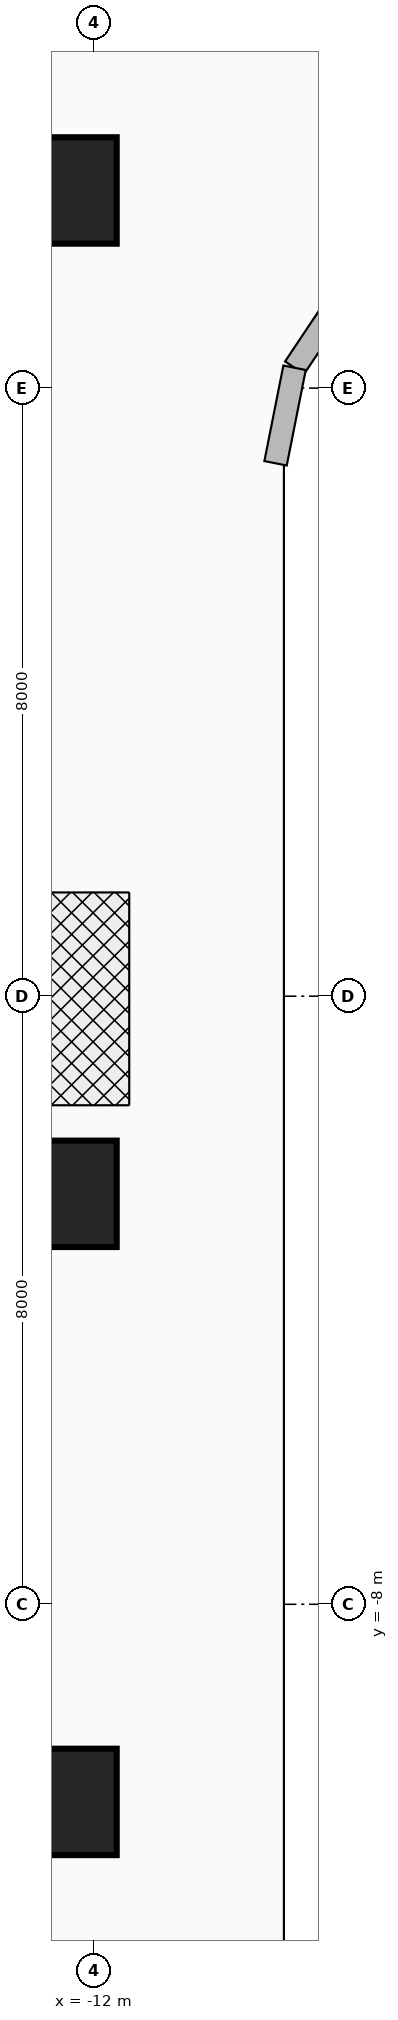
"""IFC4 building model, lengths in metres.
Left out: names, types, materials, properties, quantities, classifications, styles, units other than length and angle.
Written with IfcOpenShell. Run it as: python <this file> out.ifc"""

import sys

from ifc_helpers import new_model, si_unit, direction, frame, frame_2d, origin, origin_2d, place, context, subcontext, project, spatial, rectangle, extrude, source, transform, mapped, element, save


model = new_model("IFC4")
c1 = context("Model", 3, precision=1e-05, world=origin(), true_north=direction((0.0, 1.0)))
c2 = subcontext(c1, "Body", "Model", "MODEL_VIEW")
j1 = project(units=[si_unit("LENGTHUNIT", "METRE"), si_unit("PLANEANGLEUNIT", "RADIAN")], contexts=[c1])
p1 = place(None, origin())
s1 = spatial("IfcSite", under=j1, at=p1, CompositionType="ELEMENT")
p2 = place(p1, origin())
s2 = spatial("IfcBuilding", under=s1, at=p2, CompositionType="ELEMENT")
p3 = place(p2, frame((0.0, 0.0, 48.2)))
s3 = spatial("IfcBuildingStorey", under=s2, at=p3, CompositionType="ELEMENT", Elevation=48.2)
for number, where, z_axis, x_axis in (
    (1, (-22.65, 10.8, 0.0), (0.0, 0.0, 1.0), (1.0, 0.0, 0.0)),
    (2, (-22.65, -10.8, 0.0), (0.0, 0.0, 1.0), (1.0, 0.0, 0.0)),
):
    element("IfcWall", number, at=place(p3, frame(where, z_axis=z_axis, x_axis=x_axis)), inside=s3, PredefinedType="SHEAR", context=c2, shape_type="SweptSolid", body=[
        extrude(rectangle(XDim=10.25, YDim=0.7, at=frame_2d((5.125, 0.0))), origin(), (0.0, 0.0, 1.0), 3.46),
    ])
m1 = source(origin(), c2, "Body", "SweptSolid", [
    extrude(rectangle(XDim=1.4, YDim=1.4, at=origin_2d()), origin(), (0.0, 0.0, 1.0), 3.7),
])
for number, where, z_axis, x_axis in (
    (3, (-12.4, -10.6, 0.0), (0.0, 0.0, 1.0), (1.0, 0.0, 0.0)),
    (4, (-12.4, -2.6, 0.0), (0.0, 0.0, 1.0), (1.0, 0.0, 0.0)),
    (5, (-12.4, 10.6, 0.0), (0.0, 0.0, 1.0), (1.0, 0.0, 0.0)),
):
    element("IfcColumn", number, at=place(p3, frame(where, z_axis=z_axis, x_axis=x_axis)), inside=s3, PredefinedType="COLUMN", context=c2, shape_type="MappedRepresentation", body=[
        mapped(m1, transform((0.0, 0.0, 0.0), x_axis=(1.0, 0.0, 0.0), y_axis=(0.0, 1.0, 0.0), z_axis=(0.0, 0.0, 1.0), scale=1.0)),
    ])
p4 = place(p3, frame((-8.642, 9.342, 0.0), z_axis=(0.0, 0.0, 1.0), x_axis=(-0.555615398575, -0.831439431869, 0.0)))
e6 = element("IfcWall", 6, at=p4, inside=s3, PredefinedType="SOLIDWALL", context=c2, shape_type="SweptSolid", body=[
    extrude(rectangle(XDim=1.292, YDim=0.3, at=frame_2d((0.646, 0.0))), origin(), (0.0, 0.0, 1.0), 3.46),
])
p5 = place(p3, frame((-9.36, 8.268, 0.0), z_axis=(0.0, 0.0, 1.0), x_axis=(-0.195090163074, -0.980785312019, 0.0)))
e7 = element("IfcWall", 7, at=p5, inside=s3, PredefinedType="SOLIDWALL", context=c2, shape_type="SweptSolid", body=[
    extrude(rectangle(XDim=1.281, YDim=0.3, at=frame_2d((0.641, 0.0))), origin(), (0.0, 0.0, 1.0), 3.46),
])
save(model, sys.argv[1])
